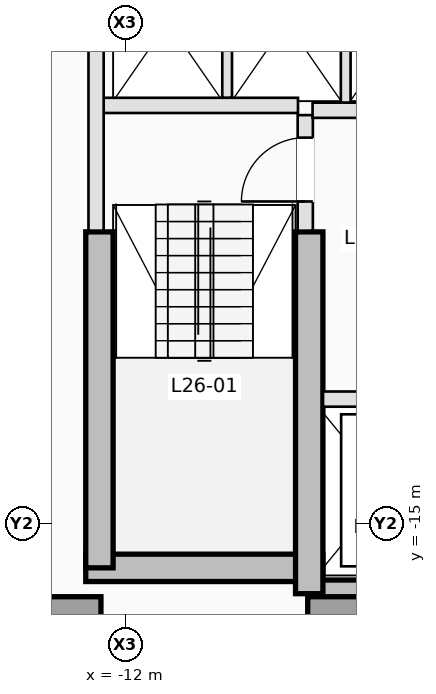
"""IFC4 building model, lengths in metres.
Left out: names, types, materials, properties, quantities, classifications, styles, units other than length and angle.
Written with IfcOpenShell. Run it as: python <this file> out.ifc"""

import sys

from ifc_helpers import new_model, si_unit, direction, frame, frame_2d, origin, origin_2d, place, context, subcontext, project, spatial, rectangle, extrude, element, fill, save


model = new_model("IFC4")
c1 = context("Model", 3, precision=1e-05, world=origin(), true_north=direction((0.0, 1.0)))
c2 = subcontext(c1, "Body", "Model", "MODEL_VIEW")
j1 = project(units=[si_unit("LENGTHUNIT", "METRE"), si_unit("PLANEANGLEUNIT", "RADIAN")], contexts=[c1])
p1 = place(None, origin())
s1 = spatial("IfcSite", under=j1, at=p1, CompositionType="ELEMENT")
p2 = place(p1, origin())
s2 = spatial("IfcBuilding", under=s1, at=p2, CompositionType="ELEMENT")
p3 = place(p2, frame((0.0, 0.0, 98.5)))
s3 = spatial("IfcBuildingStorey", under=s2, at=p3, CompositionType="ELEMENT", Elevation=98.5)
p4 = place(p3, frame((-12.65, -15.725, 0.0), z_axis=(0.0, 0.0, 1.0), x_axis=(1.0, 0.0, 0.0)))
e1 = element("IfcWall", 1, at=p4, inside=s3, PredefinedType="SHEAR", context=c2, shape_type="SweptSolid", body=[
    extrude(rectangle(XDim=3.9, YDim=0.45, at=frame_2d((1.95, 0.0))), origin(), (0.0, 0.0, 1.0), 3.5),
])
p5 = place(p3, frame((-8.975, -16.15, 0.0), z_axis=(0.0, 0.0, 1.0), x_axis=(1.0, 0.0, 0.0)))
e2 = element("IfcWall", 2, at=p5, inside=s3, PredefinedType="SHEAR", context=c2, shape_type="SweptSolid", body=[
    extrude(rectangle(XDim=5.225, YDim=0.45, at=frame_2d((2.613, 0.0))), origin(), (0.0, 0.0, 1.0), 3.5),
])
p6 = place(p3, frame((-12.425, -15.725, 0.0), z_axis=(0.0, 0.0, 1.0), x_axis=(0.0, 1.0, 0.0)))
e3 = element("IfcWall", 3, at=p6, inside=s3, PredefinedType="SHEAR", context=c2, shape_type="SweptSolid", body=[
    extrude(rectangle(XDim=5.525, YDim=0.45, at=frame_2d((2.763, 0.0))), origin(), (0.0, 0.0, 1.0), 3.5),
])
p7 = place(p3, frame((-8.975, -16.15, 0.0), z_axis=(0.0, 0.0, 1.0), x_axis=(0.0, 1.0, 0.0)))
e4 = element("IfcWall", 4, at=p7, inside=s3, PredefinedType="SHEAR", context=c2, shape_type="SweptSolid", body=[
    extrude(rectangle(XDim=5.95, YDim=0.45, at=frame_2d((2.975, 0.0))), origin(), (0.0, 0.0, 1.0), 3.5),
])
for number, where, z_axis, x_axis in (
    (5, (-12.95, -16.75, 0.0), (0.0, 0.0, 1.0), (1.0, 0.0, 0.0)),
    (6, (-8.45, -16.75, 0.0), (0.0, 0.0, 1.0), (1.0, 0.0, 0.0)),
):
    element("IfcColumn", number, at=place(p3, frame(where, z_axis=z_axis, x_axis=x_axis)), inside=s3, PredefinedType="COLUMN", context=c2, shape_type="SweptSolid", body=[
        extrude(rectangle(XDim=1.1, YDim=1.1, at=origin_2d()), origin(), (0.0, 0.0, 1.0), 3.5),
    ])
p8 = place(p3, frame((-9.04, -10.18, 0.0), z_axis=(0.0, 0.0, 1.0), x_axis=(0.0, 1.0, 0.0)))
e7 = element("IfcWall", 7, at=p8, inside=s3, PredefinedType="PARTITIONING", context=c2, shape_type="SweptSolid", body=[
    extrude(rectangle(XDim=1.9, YDim=0.25, at=frame_2d((0.95, 0.0))), origin(), (0.0, 0.0, 1.0), 3.25),
])
p9 = place(p8, frame((0.48, 0.0, 0.0)))
e8 = element("IfcOpeningElement", 8, at=p9, cuts=e7, PredefinedType="OPENING", context=c2, shape_type="SweptSolid", body=[
    extrude(rectangle(XDim=1.05, YDim=2.15, at=frame_2d((0.525, 1.075))), frame((0.0, 0.135, 0.0), z_axis=(0.0, -1.0, 0.0), x_axis=(1.0, 0.0, 0.0)), (0.0, 0.0, 1.0), 0.27),
])
p10 = place(p3, frame((-12.38, -8.12, 0.0), z_axis=(0.0, 0.0, 1.0), x_axis=(1.0, 0.0, 0.0)))
e9 = element("IfcWall", 9, at=p10, inside=s3, PredefinedType="PARTITIONING", context=c2, shape_type="SweptSolid", body=[
    extrude(rectangle(XDim=3.22, YDim=0.25, at=frame_2d((1.61, 0.0))), origin(), (0.0, 0.0, 1.0), 3.25),
])
p11 = place(p3, frame((-12.48, -10.18, 0.0), z_axis=(0.0, 0.0, 1.0), x_axis=(0.0, 1.0, 0.0)))
e10 = element("IfcWall", 10, at=p11, inside=s3, PredefinedType="PARTITIONING", context=c2, shape_type="SweptSolid", body=[
    extrude(rectangle(XDim=4.828, YDim=0.25, at=frame_2d((2.414, 0.0))), origin(), (0.0, 0.0, 1.0), 3.25),
])
p12 = place(p3, frame((-8.748, -12.95, 0.0), z_axis=(0.0, 0.0, 1.0), x_axis=(1.0, 0.0, 0.0)))
e11 = element("IfcWall", 11, at=p12, inside=s3, PredefinedType="PARTITIONING", context=c2, shape_type="SweptSolid", body=[
    extrude(rectangle(XDim=5.068, YDim=0.25, at=frame_2d((2.534, 0.0))), origin(), (0.0, 0.0, 1.0), 3.25),
])
p13 = place(p12, frame((0.648, 0.0, 0.0)))
e12 = element("IfcOpeningElement", 12, at=p13, cuts=e11, PredefinedType="OPENING", context=c2, shape_type="SweptSolid", body=[
    extrude(rectangle(XDim=1.1, YDim=2.15, at=frame_2d((0.55, 1.075))), frame((0.0, 0.135, 0.0), z_axis=(0.0, -1.0, 0.0), x_axis=(1.0, 0.0, 0.0)), (0.0, 0.0, 1.0), 0.27),
])
p14 = place(p12, frame((2.548, 0.0, 0.0)))
e13 = element("IfcOpeningElement", 13, at=p14, cuts=e11, PredefinedType="OPENING", context=c2, shape_type="SweptSolid", body=[
    extrude(rectangle(XDim=0.88, YDim=2.1, at=frame_2d((0.44, 1.05))), frame((0.0, 0.135, 0.0), z_axis=(0.0, -1.0, 0.0), x_axis=(1.0, 0.0, 0.0)), (0.0, 0.0, 1.0), 0.27),
])
p15 = place(p12, frame((3.948, 0.0, 0.0)))
e14 = element("IfcOpeningElement", 14, at=p15, cuts=e11, PredefinedType="OPENING", context=c2, shape_type="SweptSolid", body=[
    extrude(rectangle(XDim=0.88, YDim=2.1, at=frame_2d((0.44, 1.05))), frame((0.0, 0.135, 0.0), z_axis=(0.0, -1.0, 0.0), x_axis=(1.0, 0.0, 0.0)), (0.0, 0.0, 1.0), 0.27),
])
p16 = place(p3, frame((-8.92, -8.2, 0.0), z_axis=(0.0, 0.0, 1.0), x_axis=(1.0, 0.0, 0.0)))
e15 = element("IfcWall", 15, at=p16, inside=s3, PredefinedType="PARTITIONING", context=c2, shape_type="SweptSolid", body=[
    extrude(rectangle(XDim=5.24, YDim=0.25, at=frame_2d((2.62, 0.0))), origin(), (0.0, 0.0, 1.0), 3.25),
])
p17 = place(p3, frame((-10.325, -7.993, 0.0), z_axis=(0.0, 0.0, 1.0), x_axis=(0.0, 1.0, 0.0)))
e16 = element("IfcWall", 16, at=p17, inside=s3, PredefinedType="PARTITIONING", context=c2, shape_type="SweptSolid", body=[
    extrude(rectangle(XDim=2.653, YDim=0.16, at=frame_2d((1.326, 0.0))), origin(), (0.0, 0.0, 1.0), 3.25),
])
p18 = place(p3, frame((-8.375, -8.073, 0.0), z_axis=(0.0, 0.0, 1.0), x_axis=(0.0, 1.0, 0.0)))
e17 = element("IfcWall", 17, at=p18, inside=s3, PredefinedType="PARTITIONING", context=c2, shape_type="SweptSolid", body=[
    extrude(rectangle(XDim=2.733, YDim=0.16, at=frame_2d((1.366, 0.0))), origin(), (0.0, 0.0, 1.0), 3.25),
])
p19 = place(p9, origin())
e18 = element("IfcDoor", 18, at=p19, inside=s3, OperationType="SINGLE_SWING_LEFT", PredefinedType="DOOR", context=c2, shape_type="SweptSolid", body=[
    extrude(rectangle(XDim=1.05, YDim=2.15, at=frame_2d((0.525, 1.075))), frame((0.0, 0.025, 0.0), z_axis=(0.0, -1.0, 0.0), x_axis=(1.0, 0.0, 0.0)), (0.0, 0.0, 1.0), 0.05),
])
fill(e8, e18)
save(model, sys.argv[1])
